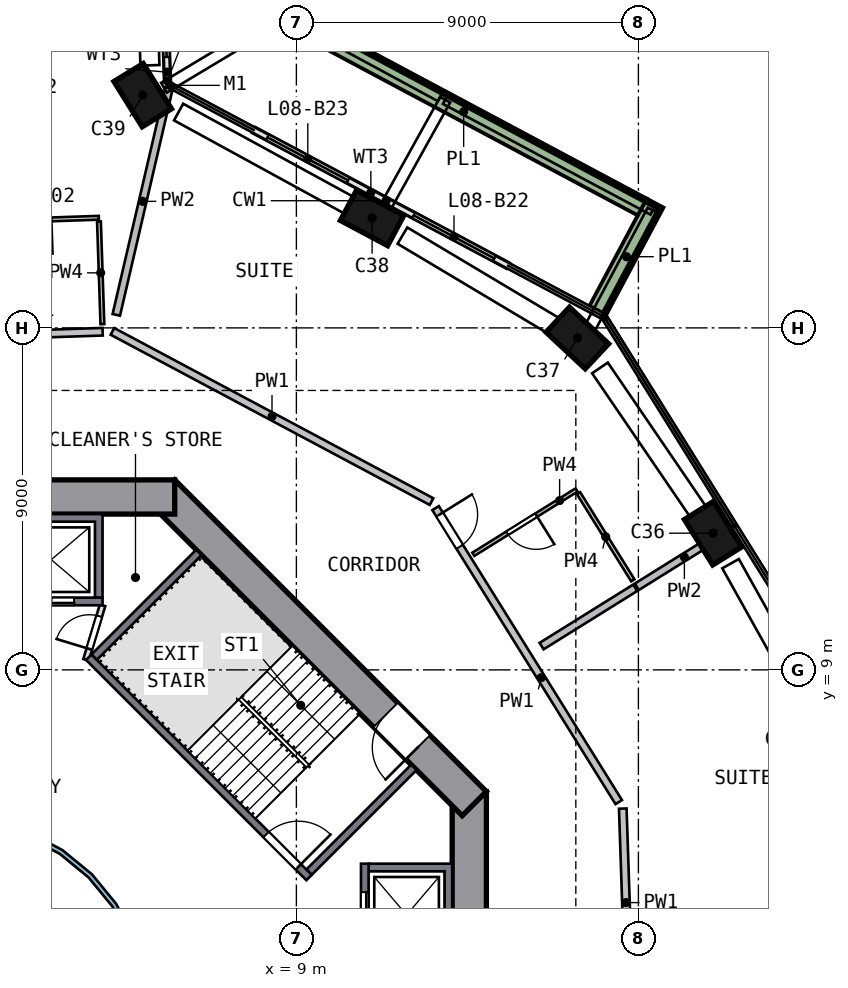
"""IFC4 building model, lengths in metres.
Left out: names, types, materials, properties, quantities, classifications, styles, units other than length and angle.
Written with IfcOpenShell. Run it as: python <this file> out.ifc"""

import sys

from ifc_helpers import new_model, si_unit, direction, frame, frame_2d, origin, origin_2d, place, context, subcontext, project, spatial, polyline, rectangle, outline, extrude, element, fill, save


model = new_model("IFC4")
c1 = context("Model", 3, precision=1e-05, world=origin(), true_north=direction((0.0, 1.0)))
c2 = subcontext(c1, "Body", "Model", "MODEL_VIEW")
j1 = project(units=[si_unit("LENGTHUNIT", "METRE"), si_unit("PLANEANGLEUNIT", "RADIAN")], contexts=[c1])
p1 = place(None, origin())
s1 = spatial("IfcSite", under=j1, at=p1, CompositionType="ELEMENT")
p2 = place(p1, origin())
s2 = spatial("IfcBuilding", under=s1, at=p2, CompositionType="ELEMENT")
p3 = place(p2, frame((0.0, 0.0, 42.5)))
s3 = spatial("IfcBuildingStorey", under=s2, at=p3, CompositionType="ELEMENT", Elevation=42.5)
p4 = place(p3, frame((20.038, 12.482, 0.0), z_axis=(-0.060155823, 0.09483478, 0.99367381), x_axis=(-0.525120526, 0.843585782, -0.112300766)))
e1 = element("IfcColumn", 1, at=p4, inside=s3, PredefinedType="COLUMN", context=c2, shape_type="SweptSolid", body=[
    extrude(rectangle(XDim=1.4, YDim=0.9, at=origin_2d()), origin(), (0.0, 0.0, 1.0), 3.21),
])
p5 = place(p3, frame((16.496, 17.64, 0.0), z_axis=(-0.084543456, 0.07770091, 0.993385611), x_axis=(0.725671316, -0.678392991, 0.114821992)))
e2 = element("IfcColumn", 2, at=p5, inside=s3, PredefinedType="COLUMN", context=c2, shape_type="SweptSolid", body=[
    extrude(rectangle(XDim=1.4, YDim=0.9, at=origin_2d()), origin(), (0.0, 0.0, 1.0), 3.211),
])
p6 = place(p3, frame((11.113, 20.829, 0.0), z_axis=(-0.099549321, 0.052094183, 0.993668017), x_axis=(-0.876466072, 0.468171177, -0.112352009)))
e3 = element("IfcColumn", 3, at=p6, inside=s3, PredefinedType="COLUMN", context=c2, shape_type="SweptSolid", body=[
    extrude(rectangle(XDim=1.4, YDim=0.9, at=origin_2d()), origin(), (0.0, 0.0, 1.0), 3.21),
])
p7 = place(p3, frame((5.095, 24.096, 0.0), z_axis=(-0.114771967, 0.023258425, 0.99311955), x_axis=(0.521259361, -0.849627286, 0.080138343)))
e4 = element("IfcColumn", 4, at=p7, inside=s3, PredefinedType="COLUMN", context=c2, shape_type="SweptSolid", body=[
    extrude(rectangle(XDim=1.4, YDim=0.9, at=origin_2d()), origin(), (0.0, 0.0, 1.0), 3.212),
])
p8 = place(p3, frame((13.55, -5.799, 0.0), z_axis=(0.0, 0.0, 1.0), x_axis=(0.0, 1.0, 0.0)))
e5 = element("IfcWall", 5, at=p8, inside=s3, PredefinedType="SHEAR", context=c2, shape_type="SweptSolid", body=[
    extrude(rectangle(XDim=11.598, YDim=0.9, at=frame_2d((5.799, 0.0))), origin(), (0.0, 0.0, 1.0), 3.5),
])
p9 = place(p8, frame((4.899, 0.0, 0.0)))
e6 = element("IfcOpeningElement", 6, at=p9, cuts=e5, PredefinedType="OPENING", context=c2, shape_type="SweptSolid", body=[
    extrude(rectangle(XDim=1.8, YDim=2.1, at=frame_2d((0.9, 1.05))), frame((0.0, 0.46, 0.0), z_axis=(0.0, -1.0, 0.0), x_axis=(1.0, 0.0, 0.0)), (0.0, 0.0, 1.0), 0.92),
])
p10 = place(p3, frame((13.682, 5.481, 0.0), z_axis=(0.0, 0.0, 1.0), x_axis=(-0.707106781, 0.707106781, 0.0)))
e7 = element("IfcWall", 7, at=p10, inside=s3, PredefinedType="SHEAR", context=c2, shape_type="SweptSolid", body=[
    extrude(rectangle(XDim=11.598, YDim=0.9, at=frame_2d((5.799, 0.0))), origin(), (0.0, 0.0, 1.0), 3.5),
])
p11 = place(p10, frame((2.099, 0.0, 0.0)))
e8 = element("IfcOpeningElement", 8, at=p11, cuts=e7, PredefinedType="OPENING", context=c2, shape_type="SweptSolid", body=[
    extrude(rectangle(XDim=1.2, YDim=2.1, at=frame_2d((0.6, 1.05))), frame((0.0, 0.46, 0.0), z_axis=(0.0, -1.0, 0.0), x_axis=(1.0, 0.0, 0.0)), (0.0, 0.0, 1.0), 0.92),
])
p12 = place(p3, frame((5.799, 13.55, 0.0), z_axis=(0.0, 0.0, 1.0), x_axis=(-1.0, 0.0, 0.0)))
e9 = element("IfcWall", 9, at=p12, inside=s3, PredefinedType="SHEAR", context=c2, shape_type="SweptSolid", body=[
    extrude(rectangle(XDim=11.598, YDim=0.9, at=frame_2d((5.799, 0.0))), origin(), (0.0, 0.0, 1.0), 3.5),
])
p13 = place(p12, frame((4.899, 0.0, 0.0)))
e10 = element("IfcOpeningElement", 10, at=p13, cuts=e9, PredefinedType="OPENING", context=c2, shape_type="SweptSolid", body=[
    extrude(rectangle(XDim=1.8, YDim=2.1, at=frame_2d((0.9, 1.05))), frame((0.0, 0.46, 0.0), z_axis=(0.0, -1.0, 0.0), x_axis=(1.0, 0.0, 0.0)), (0.0, 0.0, 1.0), 0.92),
])
p14 = place(p3, frame((5.606, 24.53, 0.0), z_axis=(0.0, 0.0, 1.0), x_axis=(-0.033443869, 0.999440597, 0.0)))
e11 = element("IfcWall", 11, at=p14, inside=s3, PredefinedType="SOLIDWALL", context=c2, shape_type="SweptSolid", body=[
    extrude(rectangle(XDim=3.402, YDim=0.15, at=frame_2d((1.701, 0.0))), origin(), (0.0, 0.0, 1.0), 2.425),
])
p15 = place(p14, frame((0.602, 0.0, 0.0)))
e12 = element("IfcOpeningElement", 12, at=p15, cuts=e11, PredefinedType="OPENING", context=c2, shape_type="SweptSolid", body=[
    extrude(rectangle(XDim=2.4, YDim=2.4, at=frame_2d((1.2, 1.2))), frame((0.0, 0.085, 0.0), z_axis=(0.0, -1.0, 0.0), x_axis=(1.0, 0.0, 0.0)), (0.0, 0.0, 1.0), 0.17),
])
p16 = place(p3, frame((14.559, 19.642, 0.0), z_axis=(0.0, 0.0, 1.0), x_axis=(-0.882272201, 0.470739592, 0.0)))
e13 = element("IfcWall", 13, at=p16, inside=s3, PredefinedType="SOLIDWALL", context=c2, shape_type="SweptSolid", body=[
    extrude(rectangle(XDim=3.6, YDim=0.15, at=frame_2d((1.8, 0.0))), origin(), (0.0, 0.0, 1.0), 2.425),
])
p17 = place(p16, frame((0.4, 0.0, 0.0)))
e14 = element("IfcOpeningElement", 14, at=p17, cuts=e13, PredefinedType="OPENING", context=c2, shape_type="SweptSolid", body=[
    extrude(rectangle(XDim=2.4, YDim=2.4, at=frame_2d((1.2, 1.2))), frame((0.0, 0.085, 0.0), z_axis=(0.0, -1.0, 0.0), x_axis=(1.0, 0.0, 0.0)), (0.0, 0.0, 1.0), 0.17),
])
p18 = place(p3, frame((11.383, 21.337, 0.0), z_axis=(0.0, 0.0, 1.0), x_axis=(-0.882291504, 0.470703411, 0.0)))
e15 = element("IfcWall", 15, at=p18, inside=s3, PredefinedType="SOLIDWALL", context=c2, shape_type="SweptSolid", body=[
    extrude(rectangle(XDim=3.961, YDim=0.15, at=frame_2d((1.98, 0.0))), origin(), (0.0, 0.0, 1.0), 2.425),
])
p19 = place(p18, frame((1.16, 0.0, 0.0)))
e16 = element("IfcOpeningElement", 16, at=p19, cuts=e15, PredefinedType="OPENING", context=c2, shape_type="SweptSolid", body=[
    extrude(rectangle(XDim=2.4, YDim=2.4, at=frame_2d((1.2, 1.2))), frame((0.0, 0.085, 0.0), z_axis=(0.0, -1.0, 0.0), x_axis=(1.0, 0.0, 0.0)), (0.0, 0.0, 1.0), 0.17),
])
p20 = place(p3, frame((16.933, 18.462, 0.0), z_axis=(0.0, 0.0, 1.0), x_axis=(0.470655574, 0.882317024, 0.0)))
e17 = element("IfcWall", 17, at=p20, inside=s3, PredefinedType="SOLIDWALL", context=c2, shape_type="SweptSolid", body=[
    extrude(rectangle(XDim=3.199, YDim=0.5, at=frame_2d((1.6, 0.0))), origin(), (0.0, 0.0, 1.0), 0.7),
])
p21 = place(p3, frame((18.101, 21.181, 0.0), z_axis=(0.0, 0.0, 1.0), x_axis=(-0.882293298, 0.470700048, 0.0)))
e18 = element("IfcWall", 18, at=p21, inside=s3, PredefinedType="SOLIDWALL", context=c2, shape_type="SweptSolid", body=[
    extrude(rectangle(XDim=10.653, YDim=0.5, at=frame_2d((5.326, 0.0))), origin(), (0.0, 0.0, 1.0), 0.7),
])
p22 = place(p3, origin())
e19 = element("IfcWall", 19, at=p22, inside=s3, PredefinedType="SOLIDWALL", context=c2, shape_type="SweptSolid", body=[
    extrude(outline(polyline([(13.1, 3.9), (13.1, 1.2), (10.9, 1.2), (10.9, 1.4), (12.9, 1.4), (12.9, 3.7), (10.9, 3.7), (10.9, 3.9), (13.1, 3.9)])), origin(), (0.0, 0.0, 1.0), 3.19),
])
p23 = place(p3, frame((10.8, 1.2, 0.0), z_axis=(0.0, 0.0, 1.0), x_axis=(0.0, 1.0, 0.0)))
e20 = element("IfcWall", 20, at=p23, inside=s3, PredefinedType="SOLIDWALL", context=c2, shape_type="SweptSolid", body=[
    extrude(rectangle(XDim=2.7, YDim=0.2, at=frame_2d((1.35, 0.0))), origin(), (0.0, 0.0, 1.0), 3.19),
])
p24 = place(p23, frame((0.75, 0.0, 0.0)))
e21 = element("IfcOpeningElement", 21, at=p24, cuts=e20, PredefinedType="OPENING", context=c2, shape_type="SweptSolid", body=[
    extrude(rectangle(XDim=1.2, YDim=2.1, at=frame_2d((0.6, 1.05))), frame((0.0, 0.11, 0.0), z_axis=(0.0, -1.0, 0.0), x_axis=(1.0, 0.0, 0.0)), (0.0, 0.0, 1.0), 0.22),
])
p25 = place(p3, origin())
e22 = element("IfcWall", 22, at=p25, inside=s3, PredefinedType="SOLIDWALL", context=c2, shape_type="SweptSolid", body=[
    extrude(outline(polyline([(3.9, 13.1), (3.9, 10.9), (3.7, 10.9), (3.7, 12.9), (1.4, 12.9), (1.4, 10.9), (1.2, 10.9), (1.2, 13.1), (3.9, 13.1)])), origin(), (0.0, 0.0, 1.0), 3.19),
])
p26 = place(p3, frame((1.2, 10.8, 0.0), z_axis=(0.0, 0.0, 1.0), x_axis=(1.0, 0.0, 0.0)))
e23 = element("IfcWall", 23, at=p26, inside=s3, PredefinedType="SOLIDWALL", context=c2, shape_type="SweptSolid", body=[
    extrude(rectangle(XDim=2.7, YDim=0.2, at=frame_2d((1.35, 0.0))), origin(), (0.0, 0.0, 1.0), 3.19),
])
p27 = place(p26, frame((0.75, 0.0, 0.0)))
e24 = element("IfcOpeningElement", 24, at=p27, cuts=e23, PredefinedType="OPENING", context=c2, shape_type="SweptSolid", body=[
    extrude(rectangle(XDim=1.2, YDim=2.1, at=frame_2d((0.6, 1.05))), frame((0.0, 0.11, 0.0), z_axis=(0.0, -1.0, 0.0), x_axis=(1.0, 0.0, 0.0)), (0.0, 0.0, 1.0), 0.22),
])
p28 = place(p3, frame((3.535, 9.334, 0.0), z_axis=(0.0, 0.0, 1.0), x_axis=(0.707106781, -0.707106781, 0.0)))
e25 = element("IfcWall", 25, at=p28, inside=s3, PredefinedType="SOLIDWALL", context=c2, shape_type="SweptSolid", body=[
    extrude(rectangle(XDim=8.2, YDim=0.2, at=frame_2d((4.1, 0.0))), origin(), (0.0, 0.0, 1.0), 3.19),
])
p29 = place(p28, frame((6.6, 0.0, 0.0)))
e26 = element("IfcOpeningElement", 26, at=p29, cuts=e25, PredefinedType="OPENING", context=c2, shape_type="SweptSolid", body=[
    extrude(rectangle(XDim=1.2, YDim=2.1, at=frame_2d((0.6, 1.05))), frame((0.0, 0.11, 0.0), z_axis=(0.0, -1.0, 0.0), x_axis=(1.0, 0.0, 0.0)), (0.0, 0.0, 1.0), 0.22),
])
for number, where, z_axis, x_axis in (
    (27, (9.334, 3.677, 0.0), (0.0, 0.0, 1.0), (0.707, 0.707, 0.0)),
    (28, (3.677, 9.334, 0.0), (0.0, 0.0, 1.0), (0.707, 0.707, 0.0)),
):
    element("IfcWall", number, at=place(p3, frame(where, z_axis=z_axis, x_axis=x_axis)), inside=s3, PredefinedType="SOLIDWALL", context=c2, shape_type="SweptSolid", body=[
        extrude(rectangle(XDim=3.9, YDim=0.2, at=frame_2d((1.95, 0.0))), origin(), (0.0, 0.0, 1.0), 3.19),
    ])
p30 = place(p3, frame((3.465, 9.263, 0.0), z_axis=(0.0, 0.0, 1.0), x_axis=(0.289808785, 0.957084567, 0.0)))
e29 = element("IfcWall", 29, at=p30, inside=s3, PredefinedType="PARTITIONING", context=c2, shape_type="SweptSolid", body=[
    extrude(rectangle(XDim=1.501, YDim=0.15, at=frame_2d((0.75, 0.0))), origin(), (0.0, 0.0, 1.0), 3.19),
])
p31 = place(p30, frame((0.301, 0.0, 0.0)))
e30 = element("IfcOpeningElement", 30, at=p31, cuts=e29, PredefinedType="OPENING", context=c2, shape_type="SweptSolid", body=[
    extrude(rectangle(XDim=0.9, YDim=2.1, at=frame_2d((0.45, 1.05))), frame((0.0, 0.085, 0.0), z_axis=(0.0, -1.0, 0.0), x_axis=(1.0, 0.0, 0.0)), (0.0, 0.0, 1.0), 0.17),
])
p32 = place(p3, origin())
e31 = element("IfcWall", 31, at=p32, inside=s3, PredefinedType="SOLIDWALL", context=c2, shape_type="SweptSolid", body=[
    extrude(outline(polyline([(5.021, -0.999), (4.73, -1.959), (4.257, -2.844), (3.62, -3.62), (2.844, -4.257), (1.959, -4.73), (0.999, -5.021), (0.0, -5.12), (-0.999, -5.021), (-1.959, -4.73), (-2.844, -4.257), (-3.62, -3.62), (-4.257, -2.844), (-4.73, -1.959), (-5.021, -0.999), (-5.12, 0.0), (-5.021, 0.999), (-4.73, 1.959), (-4.257, 2.844), (-3.62, 3.62), (-2.844, 4.257), (-1.959, 4.73), (-0.999, 5.021), (0.0, 5.12), (0.999, 5.021), (1.959, 4.73), (2.844, 4.257), (3.62, 3.62), (4.257, 2.844), (4.73, 1.959), (5.021, 0.999), (5.12, 0.0), (5.021, -0.999)]), holes=[polyline([(4.904, 0.976), (4.619, 1.913), (4.157, 2.778), (3.535, 3.535), (2.778, 4.157), (1.913, 4.619), (0.976, 4.904), (0.0, 5.0), (-0.976, 4.904), (-1.913, 4.619), (-2.778, 4.157), (-3.535, 3.535), (-4.157, 2.778), (-4.619, 1.913), (-4.904, 0.976), (-5.0, 0.0), (-4.904, -0.976), (-4.619, -1.913), (-4.157, -2.778), (-3.535, -3.535), (-2.778, -4.157), (-1.913, -4.619), (-0.976, -4.904), (0.0, -5.0), (0.976, -4.904), (1.913, -4.619), (2.778, -4.157), (3.535, -3.535), (4.157, -2.778), (4.619, -1.913), (4.904, -0.976), (5.0, 0.0), (4.904, 0.976)])]), origin(), (0.0, 0.0, 1.0), 3.19),
])
p33 = place(p3, frame((3.903, 17.899, 0.0), z_axis=(0.0, 0.0, 1.0), x_axis=(-0.999437631, -0.033532393, 0.0)))
e32 = element("IfcWall", 32, at=p33, inside=s3, PredefinedType="SOLIDWALL", context=c2, shape_type="SweptSolid", body=[
    extrude(rectangle(XDim=3.4, YDim=0.2, at=frame_2d((1.7, 0.0))), origin(), (0.0, 0.0, 1.0), 3.19),
])
p34 = place(p3, frame((12.557, 13.428, 0.0), z_axis=(0.0, 0.0, 1.0), x_axis=(-0.882292568, 0.470701417, 0.0)))
e33 = element("IfcWall", 33, at=p34, inside=s3, PredefinedType="SOLIDWALL", context=c2, shape_type="SweptSolid", body=[
    extrude(rectangle(XDim=9.516, YDim=0.2, at=frame_2d((4.758, 0.0))), origin(), (0.0, 0.0, 1.0), 3.19),
])
p35 = place(p3, frame((12.663, 13.258, 0.0), z_axis=(0.0, 0.0, 1.0), x_axis=(0.528736875, -0.84878579, 0.0)))
e34 = element("IfcWall", 34, at=p35, inside=s3, PredefinedType="SOLIDWALL", context=c2, shape_type="SweptSolid", body=[
    extrude(rectangle(XDim=9.116, YDim=0.2, at=frame_2d((4.558, 0.0))), origin(), (0.0, 0.0, 1.0), 3.19),
])
p36 = place(p35, frame((0.2, 0.0, 0.0)))
e35 = element("IfcOpeningElement", 35, at=p36, cuts=e34, PredefinedType="OPENING", context=c2, shape_type="SweptSolid", body=[
    extrude(rectangle(XDim=1.0, YDim=2.1, at=frame_2d((0.5, 1.05))), frame((0.0, 0.11, 0.0), z_axis=(0.0, -1.0, 0.0), x_axis=(1.0, 0.0, 0.0)), (0.0, 0.0, 1.0), 0.22),
])
p37 = place(p3, frame((17.589, 5.35, 0.0), z_axis=(0.0, 0.0, 1.0), x_axis=(0.033491964, -0.999438987, 0.0)))
e36 = element("IfcWall", 36, at=p37, inside=s3, PredefinedType="SOLIDWALL", context=c2, shape_type="SweptSolid", body=[
    extrude(rectangle(XDim=9.316, YDim=0.2, at=frame_2d((4.658, 0.0))), origin(), (0.0, 0.0, 1.0), 3.19),
])
p38 = place(p37, frame((5.15, 0.0, 0.0)))
e37 = element("IfcOpeningElement", 37, at=p38, cuts=e36, PredefinedType="OPENING", context=c2, shape_type="SweptSolid", body=[
    extrude(rectangle(XDim=1.0, YDim=2.1, at=frame_2d((0.5, 1.05))), frame((0.0, 0.11, 0.0), z_axis=(0.0, -1.0, 0.0), x_axis=(1.0, 0.0, 0.0)), (0.0, 0.0, 1.0), 0.22),
])
p39 = place(p3, frame((5.65, 24.316, 0.0), z_axis=(0.0, 0.0, 1.0), x_axis=(-0.226304429, -0.974056623, 0.0)))
e38 = element("IfcWall", 38, at=p39, inside=s3, PredefinedType="SOLIDWALL", context=c2, shape_type="SweptSolid", body=[
    extrude(rectangle(XDim=6.132, YDim=0.2, at=frame_2d((3.066, 0.0))), origin(), (0.0, 0.0, 1.0), 3.19),
])
p40 = place(p3, frame((15.453, 9.626, 0.0), z_axis=(0.0, 0.0, 1.0), x_axis=(0.848785892, 0.528736711, 0.0)))
e39 = element("IfcWall", 39, at=p40, inside=s3, PredefinedType="SOLIDWALL", context=c2, shape_type="SweptSolid", body=[
    extrude(rectangle(XDim=2.905, YDim=0.2, at=frame_2d((1.452, 0.0))), origin(), (0.0, 0.0, 1.0), 3.19),
])
p41 = place(p3, frame((17.957, 11.186, 0.0), z_axis=(0.0, 0.0, 1.0), x_axis=(0.848791868, 0.528727118, 0.0)))
e40 = element("IfcWall", 40, at=p41, inside=s3, PredefinedType="SOLIDWALL", context=c2, shape_type="SweptSolid", body=[
    extrude(rectangle(XDim=2.952, YDim=0.2, at=frame_2d((1.476, 0.0))), origin(), (0.0, 0.0, 1.0), 3.19),
])
p42 = place(p3, frame((3.802, 20.897, 0.0), z_axis=(0.0, 0.0, 1.0), x_axis=(-0.999438964, -0.033492649, 0.0)))
e41 = element("IfcWall", 41, at=p42, inside=s3, PredefinedType="PARTITIONING", context=c2, shape_type="SweptSolid", body=[
    extrude(rectangle(XDim=3.2, YDim=0.1, at=frame_2d((1.6, 0.0))), origin(), (0.0, 0.0, 1.0), 3.19),
])
p43 = place(p42, frame((1.25, 0.0, 0.0)))
e42 = element("IfcOpeningElement", 42, at=p43, cuts=e41, PredefinedType="OPENING", context=c2, shape_type="SweptSolid", body=[
    extrude(rectangle(XDim=0.9, YDim=2.1, at=frame_2d((0.45, 1.05))), frame((0.0, 0.06, 0.0), z_axis=(0.0, -1.0, 0.0), x_axis=(1.0, 0.0, 0.0)), (0.0, 0.0, 1.0), 0.12),
])
p44 = place(p3, frame((3.805, 20.798, 0.0), z_axis=(0.0, 0.0, 1.0), x_axis=(0.033456335, -0.99944018, 0.0)))
e43 = element("IfcWall", 43, at=p44, inside=s3, PredefinedType="PARTITIONING", context=c2, shape_type="SweptSolid", body=[
    extrude(rectangle(XDim=2.7, YDim=0.1, at=frame_2d((1.35, 0.0))), origin(), (0.0, 0.0, 1.0), 3.19),
])
p45 = place(p3, frame((16.373, 13.733, 0.0), z_axis=(0.0, 0.0, 1.0), x_axis=(-0.848811643, -0.52869537, 0.0)))
e44 = element("IfcWall", 44, at=p45, inside=s3, PredefinedType="PARTITIONING", context=c2, shape_type="SweptSolid", body=[
    extrude(rectangle(XDim=3.2, YDim=0.1, at=frame_2d((1.6, 0.0))), origin(), (0.0, 0.0, 1.0), 3.19),
])
p46 = place(p45, frame((1.25, 0.0, 0.0)))
e45 = element("IfcOpeningElement", 45, at=p46, cuts=e44, PredefinedType="OPENING", context=c2, shape_type="SweptSolid", body=[
    extrude(rectangle(XDim=0.9, YDim=2.1, at=frame_2d((0.45, 1.05))), frame((0.0, 0.06, 0.0), z_axis=(0.0, -1.0, 0.0), x_axis=(1.0, 0.0, 0.0)), (0.0, 0.0, 1.0), 0.12),
])
p47 = place(p3, frame((16.426, 13.649, 0.0), z_axis=(0.0, 0.0, 1.0), x_axis=(0.528771123, -0.848764455, 0.0)))
e46 = element("IfcWall", 46, at=p47, inside=s3, PredefinedType="PARTITIONING", context=c2, shape_type="SweptSolid", body=[
    extrude(rectangle(XDim=2.7, YDim=0.1, at=frame_2d((1.35, 0.0))), origin(), (0.0, 0.0, 1.0), 3.19),
])
p48 = place(p15, origin())
e47 = element("IfcDoor", 47, at=p48, inside=s3, OperationType="SLIDING_TO_LEFT", PredefinedType="DOOR", context=c2, shape_type="SweptSolid", body=[
    extrude(rectangle(XDim=2.4, YDim=2.4, at=frame_2d((1.2, 1.2))), frame((0.0, 0.025, 0.0), z_axis=(0.0, -1.0, 0.0), x_axis=(1.0, 0.0, 0.0)), (0.0, 0.0, 1.0), 0.05),
])
fill(e12, e47)
p49 = place(p17, origin())
e48 = element("IfcDoor", 48, at=p49, inside=s3, OperationType="SLIDING_TO_RIGHT", PredefinedType="DOOR", context=c2, shape_type="SweptSolid", body=[
    extrude(rectangle(XDim=2.4, YDim=2.4, at=frame_2d((1.2, 1.2))), frame((0.0, 0.025, 0.0), z_axis=(0.0, -1.0, 0.0), x_axis=(1.0, 0.0, 0.0)), (0.0, 0.0, 1.0), 0.05),
])
fill(e14, e48)
p50 = place(p19, origin())
e49 = element("IfcDoor", 49, at=p50, inside=s3, OperationType="SLIDING_TO_LEFT", PredefinedType="DOOR", context=c2, shape_type="SweptSolid", body=[
    extrude(rectangle(XDim=2.4, YDim=2.4, at=frame_2d((1.2, 1.2))), frame((0.0, 0.025, 0.0), z_axis=(0.0, -1.0, 0.0), x_axis=(1.0, 0.0, 0.0)), (0.0, 0.0, 1.0), 0.05),
])
fill(e16, e49)
p51 = place(p24, origin())
e50 = element("IfcDoor", 50, at=p51, inside=s3, OperationType="DOUBLE_DOOR_SLIDING", PredefinedType="DOOR", context=c2, shape_type="SweptSolid", body=[
    extrude(rectangle(XDim=1.2, YDim=2.1, at=frame_2d((0.6, 1.05))), frame((0.0, 0.025, 0.0), z_axis=(0.0, -1.0, 0.0), x_axis=(1.0, 0.0, 0.0)), (0.0, 0.0, 1.0), 0.05),
])
fill(e21, e50)
p52 = place(p27, origin())
e51 = element("IfcDoor", 51, at=p52, inside=s3, OperationType="DOUBLE_DOOR_SLIDING", PredefinedType="DOOR", context=c2, shape_type="SweptSolid", body=[
    extrude(rectangle(XDim=1.2, YDim=2.1, at=frame_2d((0.6, 1.05))), frame((0.0, 0.025, 0.0), z_axis=(0.0, -1.0, 0.0), x_axis=(1.0, 0.0, 0.0)), (0.0, 0.0, 1.0), 0.05),
])
fill(e24, e51)
p53 = place(p29, origin())
e52 = element("IfcDoor", 52, at=p53, inside=s3, OperationType="SINGLE_SWING_RIGHT", PredefinedType="DOOR", context=c2, shape_type="SweptSolid", body=[
    extrude(rectangle(XDim=1.2, YDim=2.1, at=frame_2d((0.6, 1.05))), frame((0.0, 0.025, 0.0), z_axis=(0.0, -1.0, 0.0), x_axis=(1.0, 0.0, 0.0)), (0.0, 0.0, 1.0), 0.05),
])
fill(e26, e52)
p54 = place(p11, origin())
e53 = element("IfcDoor", 53, at=p54, inside=s3, OperationType="SINGLE_SWING_LEFT", PredefinedType="DOOR", context=c2, shape_type="SweptSolid", body=[
    extrude(rectangle(XDim=1.2, YDim=2.1, at=frame_2d((0.6, 1.05))), frame((0.0, 0.025, 0.0), z_axis=(0.0, -1.0, 0.0), x_axis=(1.0, 0.0, 0.0)), (0.0, 0.0, 1.0), 0.05),
])
fill(e8, e53)
p55 = place(p31, origin())
e54 = element("IfcDoor", 54, at=p55, inside=s3, OperationType="SINGLE_SWING_LEFT", PredefinedType="DOOR", context=c2, shape_type="SweptSolid", body=[
    extrude(rectangle(XDim=0.9, YDim=2.1, at=frame_2d((0.45, 1.05))), frame((0.0, 0.025, 0.0), z_axis=(0.0, -1.0, 0.0), x_axis=(1.0, 0.0, 0.0)), (0.0, 0.0, 1.0), 0.05),
])
fill(e30, e54)
p56 = place(p36, origin())
e55 = element("IfcDoor", 55, at=p56, inside=s3, OperationType="SINGLE_SWING_LEFT", PredefinedType="DOOR", context=c2, shape_type="SweptSolid", body=[
    extrude(rectangle(XDim=1.0, YDim=2.1, at=frame_2d((0.5, 1.05))), frame((0.0, 0.025, 0.0), z_axis=(0.0, -1.0, 0.0), x_axis=(1.0, 0.0, 0.0)), (0.0, 0.0, 1.0), 0.05),
])
fill(e35, e55)
p57 = place(p46, origin())
e56 = element("IfcDoor", 56, at=p57, inside=s3, OperationType="SINGLE_SWING_LEFT", PredefinedType="DOOR", context=c2, shape_type="SweptSolid", body=[
    extrude(rectangle(XDim=0.9, YDim=2.1, at=frame_2d((0.45, 1.05))), frame((0.0, 0.025, 0.0), z_axis=(0.0, -1.0, 0.0), x_axis=(1.0, 0.0, 0.0)), (0.0, 0.0, 1.0), 0.05),
])
fill(e45, e56)
save(model, sys.argv[1])
